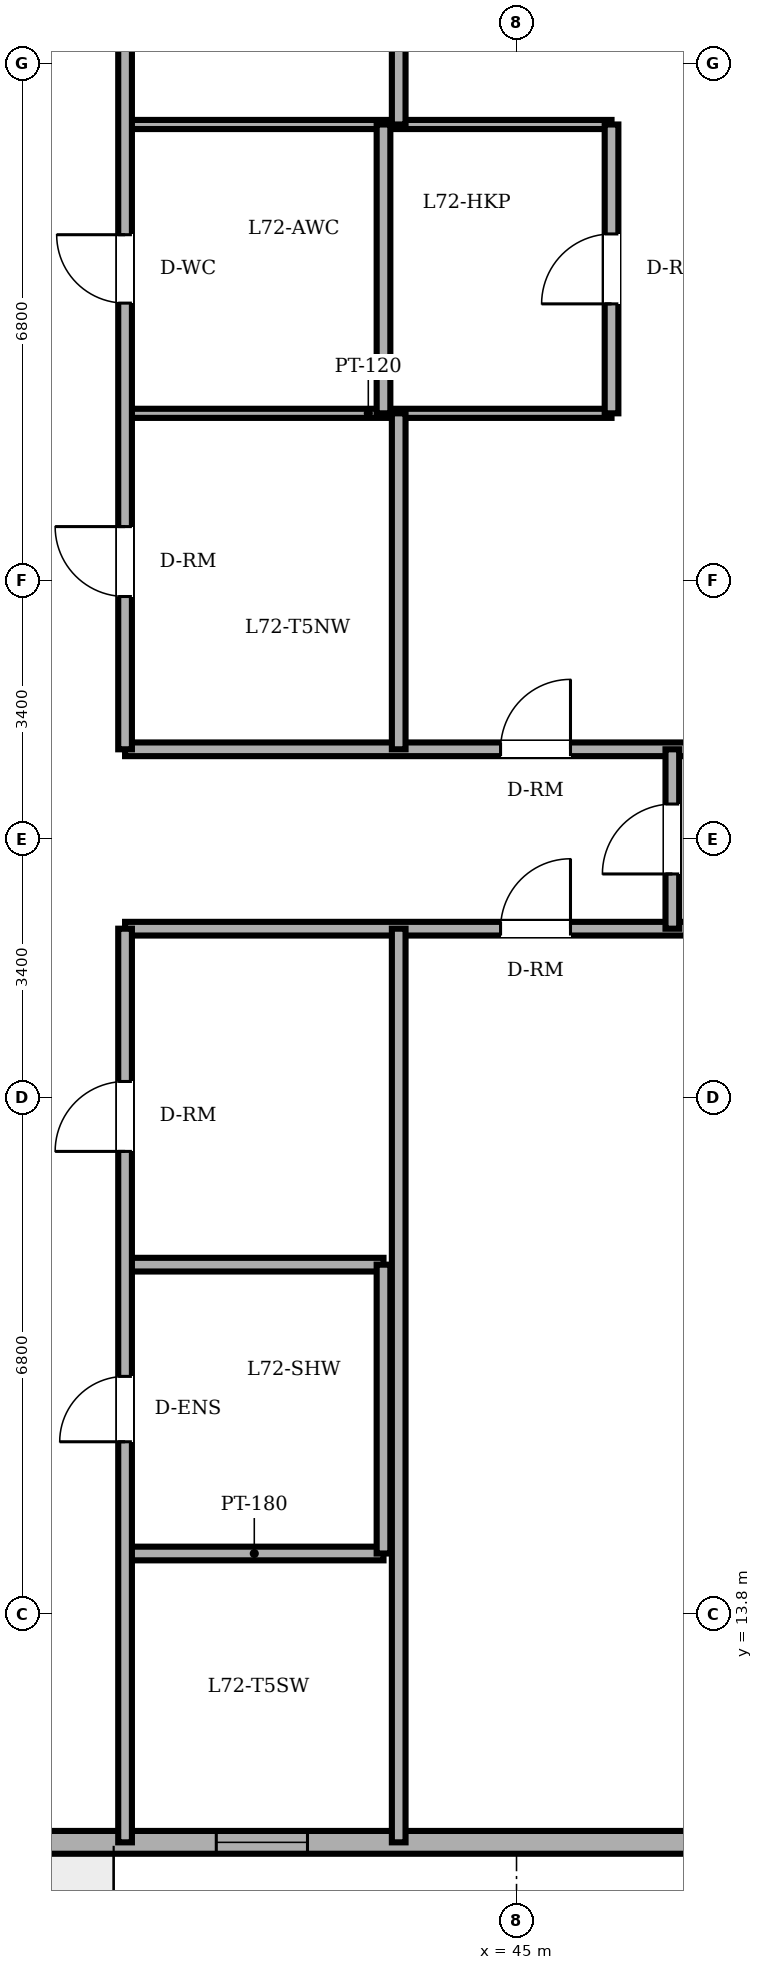
"""IFC4 building model, lengths in metres.
Left out: names, types, materials, properties, quantities, classifications, styles, units other than length and angle.
Written with IfcOpenShell. Run it as: python <this file> out.ifc"""

import sys

from ifc_helpers import new_model, si_unit, direction, frame, frame_2d, origin, place, context, subcontext, project, spatial, rectangle, extrude, element, fill, save


model = new_model("IFC4")
c1 = context("Model", 3, precision=1e-05, world=origin(), true_north=direction((0.0, 1.0)))
c2 = subcontext(c1, "Body", "Model", "MODEL_VIEW")
j1 = project(units=[si_unit("LENGTHUNIT", "METRE"), si_unit("PLANEANGLEUNIT", "RADIAN")], contexts=[c1])
p1 = place(None, origin())
s1 = spatial("IfcSite", under=j1, at=p1, CompositionType="ELEMENT")
p2 = place(p1, origin())
s2 = spatial("IfcBuilding", under=s1, at=p2, CompositionType="ELEMENT")
p3 = place(p2, frame((0.0, 0.0, 277.05)))
s3 = spatial("IfcBuildingStorey", under=s2, at=p3, CompositionType="ELEMENT", Elevation=277.05)
p4 = place(p3, frame((24.0, 10.8, 0.0), z_axis=(0.0, 0.0, 1.0), x_axis=(1.0, 0.0, 0.0)))
e1 = element("IfcWall", 1, at=p4, inside=s3, PredefinedType="SOLIDWALL", context=c2, shape_type="SweptSolid", body=[
    extrude(rectangle(XDim=37.03, YDim=0.3, at=frame_2d((18.515, 0.0))), origin(), (0.0, 0.0, 1.0), 3.45),
])
p5 = place(p4, frame((12.325, 0.0, 0.0)))
e2 = element("IfcOpeningElement", 2, at=p5, cuts=e1, PredefinedType="OPENING", context=c2, shape_type="SweptSolid", body=[
    extrude(rectangle(XDim=0.95, YDim=2.2, at=frame_2d((0.475, 1.1))), frame((0.0, 0.16, 0.0), z_axis=(0.0, -1.0, 0.0), x_axis=(1.0, 0.0, 0.0)), (0.0, 0.0, 1.0), 0.32),
])
p6 = place(p4, frame((4.917, 0.0, 0.85)))
e3 = element("IfcOpeningElement", 3, at=p6, cuts=e1, PredefinedType="OPENING", context=c2, shape_type="SweptSolid", body=[
    extrude(rectangle(XDim=1.2, YDim=1.6, at=frame_2d((0.6, 0.8))), frame((0.0, 0.16, 0.0), z_axis=(0.0, -1.0, 0.0), x_axis=(1.0, 0.0, 0.0)), (0.0, 0.0, 1.0), 0.32),
])
p7 = place(p4, frame((10.083, 0.0, 0.85)))
e4 = element("IfcOpeningElement", 4, at=p7, cuts=e1, PredefinedType="OPENING", context=c2, shape_type="SweptSolid", body=[
    extrude(rectangle(XDim=1.2, YDim=1.6, at=frame_2d((0.6, 0.8))), frame((0.0, 0.16, 0.0), z_axis=(0.0, -1.0, 0.0), x_axis=(1.0, 0.0, 0.0)), (0.0, 0.0, 1.0), 0.32),
])
p8 = place(p4, frame((17.05, 0.0, 0.85)))
e5 = element("IfcOpeningElement", 5, at=p8, cuts=e1, PredefinedType="OPENING", context=c2, shape_type="SweptSolid", body=[
    extrude(rectangle(XDim=1.2, YDim=1.6, at=frame_2d((0.6, 0.8))), frame((0.0, 0.16, 0.0), z_axis=(0.0, -1.0, 0.0), x_axis=(1.0, 0.0, 0.0)), (0.0, 0.0, 1.0), 0.32),
])
p9 = place(p4, frame((24.593, 0.0, 0.85)))
e6 = element("IfcOpeningElement", 6, at=p9, cuts=e1, PredefinedType="OPENING", context=c2, shape_type="SweptSolid", body=[
    extrude(rectangle(XDim=1.2, YDim=1.6, at=frame_2d((0.6, 0.8))), frame((0.0, 0.16, 0.0), z_axis=(0.0, -1.0, 0.0), x_axis=(1.0, 0.0, 0.0)), (0.0, 0.0, 1.0), 0.32),
])
p10 = place(p4, frame((30.337, 0.0, 0.85)))
e7 = element("IfcOpeningElement", 7, at=p10, cuts=e1, PredefinedType="OPENING", context=c2, shape_type="SweptSolid", body=[
    extrude(rectangle(XDim=1.2, YDim=1.6, at=frame_2d((0.6, 0.8))), frame((0.0, 0.16, 0.0), z_axis=(0.0, -1.0, 0.0), x_axis=(1.0, 0.0, 0.0)), (0.0, 0.0, 1.0), 0.32),
])
p11 = place(p3, frame((39.85, 14.6, 0.0), z_axis=(0.0, 0.0, 1.0), x_axis=(1.0, 0.0, 0.0)))
e8 = element("IfcWall", 8, at=p11, inside=s3, PredefinedType="PARTITIONING", context=c2, shape_type="SweptSolid", body=[
    extrude(rectangle(XDim=3.4, YDim=0.18, at=frame_2d((1.7, 0.0))), origin(), (0.0, 0.0, 1.0), 3.092),
])
p12 = place(p3, frame((39.85, 18.4, 0.0), z_axis=(0.0, 0.0, 1.0), x_axis=(1.0, 0.0, 0.0)))
e9 = element("IfcWall", 9, at=p12, inside=s3, PredefinedType="PARTITIONING", context=c2, shape_type="SweptSolid", body=[
    extrude(rectangle(XDim=3.4, YDim=0.18, at=frame_2d((1.7, 0.0))), origin(), (0.0, 0.0, 1.0), 3.132),
])
p13 = place(p3, frame((39.85, 22.82, 0.0), z_axis=(0.0, 0.0, 1.0), x_axis=(1.0, 0.0, 0.0)))
e10 = element("IfcWall", 10, at=p13, inside=s3, PredefinedType="PARTITIONING", context=c2, shape_type="SweptSolid", body=[
    extrude(rectangle(XDim=35.75, YDim=0.18, at=frame_2d((17.875, 0.0))), origin(), (0.0, 0.0, 1.0), 3.45),
])
p14 = place(p13, frame((4.94, 0.0, 0.0)))
e11 = element("IfcOpeningElement", 11, at=p14, cuts=e10, PredefinedType="OPENING", context=c2, shape_type="SweptSolid", body=[
    extrude(rectangle(XDim=0.92, YDim=2.1, at=frame_2d((0.46, 1.05))), frame((0.0, 0.1, 0.0), z_axis=(0.0, -1.0, 0.0), x_axis=(1.0, 0.0, 0.0)), (0.0, 0.0, 1.0), 0.2),
])
p15 = place(p3, frame((39.85, 25.18, 0.0), z_axis=(0.0, 0.0, 1.0), x_axis=(1.0, 0.0, 0.0)))
e12 = element("IfcWall", 12, at=p15, inside=s3, PredefinedType="PARTITIONING", context=c2, shape_type="SweptSolid", body=[
    extrude(rectangle(XDim=35.75, YDim=0.18, at=frame_2d((17.875, 0.0))), origin(), (0.0, 0.0, 1.0), 3.45),
])
p16 = place(p15, frame((4.94, 0.0, 0.0)))
e13 = element("IfcOpeningElement", 13, at=p16, cuts=e12, PredefinedType="OPENING", context=c2, shape_type="SweptSolid", body=[
    extrude(rectangle(XDim=0.92, YDim=2.1, at=frame_2d((0.46, 1.05))), frame((0.0, 0.1, 0.0), z_axis=(0.0, -1.0, 0.0), x_axis=(1.0, 0.0, 0.0)), (0.0, 0.0, 1.0), 0.2),
])
p17 = place(p3, frame((39.85, 29.6, 0.0), z_axis=(0.0, 0.0, 1.0), x_axis=(1.0, 0.0, 0.0)))
e14 = element("IfcWall", 14, at=p17, inside=s3, PredefinedType="PARTITIONING", context=c2, shape_type="SweptSolid", body=[
    extrude(rectangle(XDim=6.4, YDim=0.12, at=frame_2d((3.2, 0.0))), origin(), (0.0, 0.0, 1.0), 3.132),
])
p18 = place(p3, frame((39.85, 33.4, 0.0), z_axis=(0.0, 0.0, 1.0), x_axis=(1.0, 0.0, 0.0)))
e15 = element("IfcWall", 15, at=p18, inside=s3, PredefinedType="PARTITIONING", context=c2, shape_type="SweptSolid", body=[
    extrude(rectangle(XDim=6.4, YDim=0.12, at=frame_2d((3.2, 0.0))), origin(), (0.0, 0.0, 1.0), 3.092),
])
p19 = place(p3, frame((39.85, 10.8, 0.0), z_axis=(0.0, 0.0, 1.0), x_axis=(0.0, 1.0, 0.0)))
e16 = element("IfcWall", 16, at=p19, inside=s3, PredefinedType="PARTITIONING", context=c2, shape_type="SweptSolid", body=[
    extrude(rectangle(XDim=12.02, YDim=0.18, at=frame_2d((6.01, 0.0))), origin(), (0.0, 0.0, 1.0), 3.45),
])
p20 = place(p19, frame((5.27, 0.0, 0.0)))
e17 = element("IfcOpeningElement", 17, at=p20, cuts=e16, PredefinedType="OPENING", context=c2, shape_type="SweptSolid", body=[
    extrude(rectangle(XDim=0.86, YDim=2.1, at=frame_2d((0.43, 1.05))), frame((0.0, 0.1, 0.0), z_axis=(0.0, -1.0, 0.0), x_axis=(1.0, 0.0, 0.0)), (0.0, 0.0, 1.0), 0.2),
])
p21 = place(p19, frame((9.09, 0.0, 0.0)))
e18 = element("IfcOpeningElement", 18, at=p21, cuts=e16, PredefinedType="OPENING", context=c2, shape_type="SweptSolid", body=[
    extrude(rectangle(XDim=0.92, YDim=2.1, at=frame_2d((0.46, 1.05))), frame((0.0, 0.1, 0.0), z_axis=(0.0, -1.0, 0.0), x_axis=(1.0, 0.0, 0.0)), (0.0, 0.0, 1.0), 0.2),
])
p22 = place(p3, frame((39.85, 25.18, 0.0), z_axis=(0.0, 0.0, 1.0), x_axis=(0.0, 1.0, 0.0)))
e19 = element("IfcWall", 19, at=p22, inside=s3, PredefinedType="PARTITIONING", context=c2, shape_type="SweptSolid", body=[
    extrude(rectangle(XDim=12.02, YDim=0.18, at=frame_2d((6.01, 0.0))), origin(), (0.0, 0.0, 1.0), 3.45),
])
p23 = place(p22, frame((5.87, 0.0, 0.0)))
e20 = element("IfcOpeningElement", 20, at=p23, cuts=e19, PredefinedType="OPENING", context=c2, shape_type="SweptSolid", body=[
    extrude(rectangle(XDim=0.9, YDim=2.1, at=frame_2d((0.45, 1.05))), frame((0.0, 0.1, 0.0), z_axis=(0.0, -1.0, 0.0), x_axis=(1.0, 0.0, 0.0)), (0.0, 0.0, 1.0), 0.2),
])
p24 = place(p22, frame((2.01, 0.0, 0.0)))
e21 = element("IfcOpeningElement", 21, at=p24, cuts=e19, PredefinedType="OPENING", context=c2, shape_type="SweptSolid", body=[
    extrude(rectangle(XDim=0.92, YDim=2.1, at=frame_2d((0.46, 1.05))), frame((0.0, 0.1, 0.0), z_axis=(0.0, -1.0, 0.0), x_axis=(1.0, 0.0, 0.0)), (0.0, 0.0, 1.0), 0.2),
])
for number, where, z_axis, x_axis in (
    (22, (43.25, 14.6, 0.0), (0.0, 0.0, 1.0), (0.0, 1.0, 0.0)),
    (23, (43.25, 29.6, 0.0), (0.0, 0.0, 1.0), (0.0, 1.0, 0.0)),
):
    element("IfcWall", number, at=place(p3, frame(where, z_axis=z_axis, x_axis=x_axis)), inside=s3, PredefinedType="PARTITIONING", context=c2, shape_type="SweptSolid", body=[
        extrude(rectangle(XDim=3.8, YDim=0.18, at=frame_2d((1.9, 0.0))), origin(), (0.0, 0.0, 1.0), 3.45),
    ])
p25 = place(p3, frame((43.45, 10.8, 0.0), z_axis=(0.0, 0.0, 1.0), x_axis=(0.0, 1.0, 0.0)))
e24 = element("IfcWall", 24, at=p25, inside=s3, PredefinedType="PARTITIONING", context=c2, shape_type="SweptSolid", body=[
    extrude(rectangle(XDim=12.02, YDim=0.18, at=frame_2d((6.01, 0.0))), origin(), (0.0, 0.0, 1.0), 3.45),
])
p26 = place(p3, frame((43.45, 25.18, 0.0), z_axis=(0.0, 0.0, 1.0), x_axis=(0.0, 1.0, 0.0)))
e25 = element("IfcWall", 25, at=p26, inside=s3, PredefinedType="PARTITIONING", context=c2, shape_type="SweptSolid", body=[
    extrude(rectangle(XDim=4.42, YDim=0.18, at=frame_2d((2.21, 0.0))), origin(), (0.0, 0.0, 1.0), 3.45),
])
p27 = place(p3, frame((43.45, 33.4, 0.0), z_axis=(0.0, 0.0, 1.0), x_axis=(0.0, 1.0, 0.0)))
e26 = element("IfcWall", 26, at=p27, inside=s3, PredefinedType="PARTITIONING", context=c2, shape_type="SweptSolid", body=[
    extrude(rectangle(XDim=3.8, YDim=0.18, at=frame_2d((1.9, 0.0))), origin(), (0.0, 0.0, 1.0), 3.45),
])
p28 = place(p3, frame((46.25, 29.6, 0.0), z_axis=(0.0, 0.0, 1.0), x_axis=(0.0, 1.0, 0.0)))
e27 = element("IfcWall", 27, at=p28, inside=s3, PredefinedType="PARTITIONING", context=c2, shape_type="SweptSolid", body=[
    extrude(rectangle(XDim=3.8, YDim=0.18, at=frame_2d((1.9, 0.0))), origin(), (0.0, 0.0, 1.0), 3.45),
])
p29 = place(p28, frame((1.44, 0.0, 0.0)))
e28 = element("IfcOpeningElement", 28, at=p29, cuts=e27, PredefinedType="OPENING", context=c2, shape_type="SweptSolid", body=[
    extrude(rectangle(XDim=0.92, YDim=2.1, at=frame_2d((0.46, 1.05))), frame((0.0, 0.1, 0.0), z_axis=(0.0, -1.0, 0.0), x_axis=(1.0, 0.0, 0.0)), (0.0, 0.0, 1.0), 0.2),
])
p30 = place(p3, frame((47.05, 22.82, 0.0), z_axis=(0.0, 0.0, 1.0), x_axis=(0.0, 1.0, 0.0)))
e29 = element("IfcWall", 29, at=p30, inside=s3, PredefinedType="PARTITIONING", context=c2, shape_type="SweptSolid", body=[
    extrude(rectangle(XDim=2.36, YDim=0.18, at=frame_2d((1.18, 0.0))), origin(), (0.0, 0.0, 1.0), 3.45),
])
p31 = place(p30, frame((0.72, 0.0, 0.0)))
e30 = element("IfcOpeningElement", 30, at=p31, cuts=e29, PredefinedType="OPENING", context=c2, shape_type="SweptSolid", body=[
    extrude(rectangle(XDim=0.92, YDim=2.1, at=frame_2d((0.46, 1.05))), frame((0.0, 0.1, 0.0), z_axis=(0.0, -1.0, 0.0), x_axis=(1.0, 0.0, 0.0)), (0.0, 0.0, 1.0), 0.2),
])
p32 = place(p8, origin())
e31 = element("IfcWindow", 31, at=p32, inside=s3, PartitioningType="SINGLE_PANEL", PredefinedType="WINDOW", context=c2, shape_type="SweptSolid", body=[
    extrude(rectangle(XDim=1.2, YDim=1.6, at=frame_2d((0.6, 0.8))), frame((0.0, 0.03, 0.0), z_axis=(0.0, -1.0, 0.0), x_axis=(1.0, 0.0, 0.0)), (0.0, 0.0, 1.0), 0.06),
])
fill(e5, e31)
p33 = place(p23, origin())
e32 = element("IfcDoor", 32, at=p33, inside=s3, OperationType="SINGLE_SWING_RIGHT", PredefinedType="DOOR", context=c2, shape_type="SweptSolid", body=[
    extrude(rectangle(XDim=0.9, YDim=2.1, at=frame_2d((0.45, 1.05))), frame((0.0, 0.025, 0.0), z_axis=(0.0, -1.0, 0.0), x_axis=(1.0, 0.0, 0.0)), (0.0, 0.0, 1.0), 0.05),
])
fill(e20, e32)
p34 = place(p20, origin())
e33 = element("IfcDoor", 33, at=p34, inside=s3, OperationType="SINGLE_SWING_LEFT", PredefinedType="DOOR", context=c2, shape_type="SweptSolid", body=[
    extrude(rectangle(XDim=0.86, YDim=2.1, at=frame_2d((0.43, 1.05))), frame((0.0, 0.025, 0.0), z_axis=(0.0, -1.0, 0.0), x_axis=(1.0, 0.0, 0.0)), (0.0, 0.0, 1.0), 0.05),
])
fill(e17, e33)
p35 = place(p24, origin())
e34 = element("IfcDoor", 34, at=p35, inside=s3, OperationType="SINGLE_SWING_RIGHT", PredefinedType="DOOR", context=c2, shape_type="SweptSolid", body=[
    extrude(rectangle(XDim=0.92, YDim=2.1, at=frame_2d((0.46, 1.05))), frame((0.0, 0.025, 0.0), z_axis=(0.0, -1.0, 0.0), x_axis=(1.0, 0.0, 0.0)), (0.0, 0.0, 1.0), 0.05),
])
fill(e21, e34)
p36 = place(p21, origin())
e35 = element("IfcDoor", 35, at=p36, inside=s3, OperationType="SINGLE_SWING_LEFT", PredefinedType="DOOR", context=c2, shape_type="SweptSolid", body=[
    extrude(rectangle(XDim=0.92, YDim=2.1, at=frame_2d((0.46, 1.05))), frame((0.0, 0.025, 0.0), z_axis=(0.0, -1.0, 0.0), x_axis=(1.0, 0.0, 0.0)), (0.0, 0.0, 1.0), 0.05),
])
fill(e18, e35)
p37 = place(p16, origin())
e36 = element("IfcDoor", 36, at=p37, inside=s3, OperationType="SINGLE_SWING_RIGHT", PredefinedType="DOOR", context=c2, shape_type="SweptSolid", body=[
    extrude(rectangle(XDim=0.92, YDim=2.1, at=frame_2d((0.46, 1.05))), frame((0.0, 0.025, 0.0), z_axis=(0.0, -1.0, 0.0), x_axis=(1.0, 0.0, 0.0)), (0.0, 0.0, 1.0), 0.05),
])
fill(e13, e36)
p38 = place(p31, origin())
e37 = element("IfcDoor", 37, at=p38, inside=s3, OperationType="SINGLE_SWING_LEFT", PredefinedType="DOOR", context=c2, shape_type="SweptSolid", body=[
    extrude(rectangle(XDim=0.92, YDim=2.1, at=frame_2d((0.46, 1.05))), frame((0.0, 0.025, 0.0), z_axis=(0.0, -1.0, 0.0), x_axis=(1.0, 0.0, 0.0)), (0.0, 0.0, 1.0), 0.05),
])
fill(e30, e37)
p39 = place(p14, origin())
e38 = element("IfcDoor", 38, at=p39, inside=s3, OperationType="SINGLE_SWING_RIGHT", PredefinedType="DOOR", context=c2, shape_type="SweptSolid", body=[
    extrude(rectangle(XDim=0.92, YDim=2.1, at=frame_2d((0.46, 1.05))), frame((0.0, 0.025, 0.0), z_axis=(0.0, -1.0, 0.0), x_axis=(1.0, 0.0, 0.0)), (0.0, 0.0, 1.0), 0.05),
])
fill(e11, e38)
p40 = place(p29, origin())
e39 = element("IfcDoor", 39, at=p40, inside=s3, OperationType="SINGLE_SWING_LEFT", PredefinedType="DOOR", context=c2, shape_type="SweptSolid", body=[
    extrude(rectangle(XDim=0.92, YDim=2.1, at=frame_2d((0.46, 1.05))), frame((0.0, 0.025, 0.0), z_axis=(0.0, -1.0, 0.0), x_axis=(1.0, 0.0, 0.0)), (0.0, 0.0, 1.0), 0.05),
])
fill(e28, e39)
save(model, sys.argv[1])
